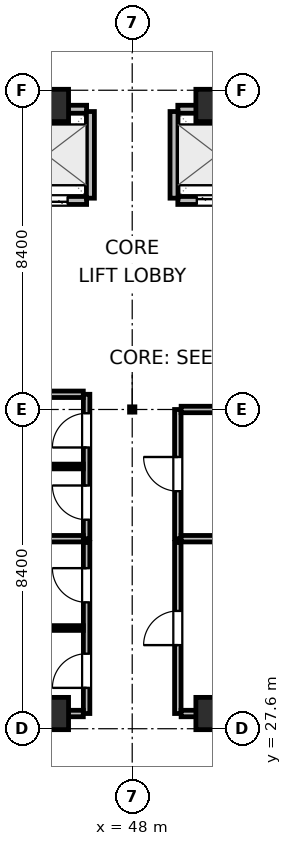
"""IFC4 building model, lengths in metres.
Left out: names, types, materials, properties, quantities, classifications, styles, units other than length and angle.
Written with IfcOpenShell. Run it as: python <this file> out.ifc"""

import sys

from ifc_helpers import new_model, si_unit, direction, frame, frame_2d, origin, origin_2d, place, context, subcontext, project, spatial, rectangle, extrude, element, fill, save


model = new_model("IFC4")
c1 = context("Model", 3, precision=1e-05, world=origin(), true_north=direction((0.0, 1.0)))
c2 = subcontext(c1, "Body", "Model", "MODEL_VIEW")
j1 = project(units=[si_unit("LENGTHUNIT", "METRE"), si_unit("PLANEANGLEUNIT", "RADIAN")], contexts=[c1])
p1 = place(None, origin())
s1 = spatial("IfcSite", under=j1, at=p1, CompositionType="ELEMENT")
p2 = place(p1, origin())
s2 = spatial("IfcBuilding", under=s1, at=p2, CompositionType="ELEMENT")
p3 = place(p2, frame((0.0, 0.0, 181.8)))
s3 = spatial("IfcBuildingStorey", under=s2, at=p3, CompositionType="ELEMENT", Elevation=181.8)
for number, where, z_axis, x_axis in (
    (1, (45.9, 28.0, 0.0), (0.0, 0.0, 1.0), (1.0, 0.0, 0.0)),
    (2, (50.1, 28.0, 0.0), (0.0, 0.0, 1.0), (1.0, 0.0, 0.0)),
    (3, (45.9, 44.0, 0.0), (0.0, 0.0, 1.0), (1.0, 0.0, 0.0)),
    (4, (50.1, 44.0, 0.0), (0.0, 0.0, 1.0), (1.0, 0.0, 0.0)),
):
    element("IfcColumn", number, at=place(p3, frame(where, z_axis=z_axis, x_axis=x_axis)), inside=s3, PredefinedType="COLUMN", context=c2, shape_type="SweptSolid", body=[
        extrude(rectangle(XDim=0.85, YDim=0.85, at=origin_2d()), origin(), (0.0, 0.0, 1.0), 4.5),
    ])
p4 = place(p3, frame((44.7, 41.5, 0.0), z_axis=(0.0, 0.0, 1.0), x_axis=(1.0, 0.0, 0.0)))
e5 = element("IfcWall", 5, at=p4, inside=s3, PredefinedType="PARTITIONING", context=c2, shape_type="SweptSolid", body=[
    extrude(rectangle(XDim=2.1, YDim=0.21, at=frame_2d((1.05, 0.0))), origin(), (0.0, 0.0, 1.0), 4.28),
])
p5 = place(p4, frame((0.5, 0.0, 0.0)))
e6 = element("IfcOpeningElement", 6, at=p5, cuts=e5, PredefinedType="OPENING", context=c2, shape_type="SweptSolid", body=[
    extrude(rectangle(XDim=1.1, YDim=2.04, at=frame_2d((0.55, 1.02))), frame((0.0, 0.115, 0.0), z_axis=(0.0, -1.0, 0.0), x_axis=(1.0, 0.0, 0.0)), (0.0, 0.0, 1.0), 0.23),
])
p6 = place(p3, frame((44.7, 43.9, 0.0), z_axis=(0.0, 0.0, 1.0), x_axis=(1.0, 0.0, 0.0)))
e7 = element("IfcWall", 7, at=p6, inside=s3, PredefinedType="PARTITIONING", context=c2, shape_type="SweptSolid", body=[
    extrude(rectangle(XDim=2.1, YDim=0.21, at=frame_2d((1.05, 0.0))), origin(), (0.0, 0.0, 1.0), 3.365),
])
p7 = place(p3, frame((46.9, 41.56, 0.0), z_axis=(0.0, 0.0, 1.0), x_axis=(0.0, 1.0, 0.0)))
e8 = element("IfcWall", 8, at=p7, inside=s3, PredefinedType="PARTITIONING", context=c2, shape_type="SweptSolid", body=[
    extrude(rectangle(XDim=2.28, YDim=0.21, at=frame_2d((1.14, 0.0))), origin(), (0.0, 0.0, 1.0), 4.28),
])
p8 = place(p3, frame((49.2, 41.5, 0.0), z_axis=(0.0, 0.0, 1.0), x_axis=(1.0, 0.0, 0.0)))
e9 = element("IfcWall", 9, at=p8, inside=s3, PredefinedType="PARTITIONING", context=c2, shape_type="SweptSolid", body=[
    extrude(rectangle(XDim=2.1, YDim=0.21, at=frame_2d((1.05, 0.0))), origin(), (0.0, 0.0, 1.0), 4.28),
])
p9 = place(p8, frame((0.5, 0.0, 0.0)))
e10 = element("IfcOpeningElement", 10, at=p9, cuts=e9, PredefinedType="OPENING", context=c2, shape_type="SweptSolid", body=[
    extrude(rectangle(XDim=1.1, YDim=2.04, at=frame_2d((0.55, 1.02))), frame((0.0, 0.115, 0.0), z_axis=(0.0, -1.0, 0.0), x_axis=(1.0, 0.0, 0.0)), (0.0, 0.0, 1.0), 0.23),
])
p10 = place(p3, frame((49.2, 43.9, 0.0), z_axis=(0.0, 0.0, 1.0), x_axis=(1.0, 0.0, 0.0)))
e11 = element("IfcWall", 11, at=p10, inside=s3, PredefinedType="PARTITIONING", context=c2, shape_type="SweptSolid", body=[
    extrude(rectangle(XDim=2.1, YDim=0.21, at=frame_2d((1.05, 0.0))), origin(), (0.0, 0.0, 1.0), 3.365),
])
p11 = place(p3, frame((49.1, 41.56, 0.0), z_axis=(0.0, 0.0, 1.0), x_axis=(0.0, 1.0, 0.0)))
e12 = element("IfcWall", 12, at=p11, inside=s3, PredefinedType="PARTITIONING", context=c2, shape_type="SweptSolid", body=[
    extrude(rectangle(XDim=2.28, YDim=0.21, at=frame_2d((1.14, 0.0))), origin(), (0.0, 0.0, 1.0), 4.28),
])
p12 = place(p3, frame((46.8, 32.6, 0.0), z_axis=(0.0, 0.0, 1.0), x_axis=(0.0, 1.0, 0.0)))
e13 = element("IfcWall", 13, at=p12, inside=s3, PredefinedType="PARTITIONING", context=c2, shape_type="SweptSolid", body=[
    extrude(rectangle(XDim=3.8, YDim=0.17, at=frame_2d((1.9, 0.0))), origin(), (0.0, 0.0, 1.0), 4.28),
])
p13 = place(p12, frame((0.5, 0.0, 0.0)))
e14 = element("IfcOpeningElement", 14, at=p13, cuts=e13, PredefinedType="OPENING", context=c2, shape_type="SweptSolid", body=[
    extrude(rectangle(XDim=0.9, YDim=2.02, at=frame_2d((0.45, 1.01))), frame((0.0, 0.095, 0.0), z_axis=(0.0, -1.0, 0.0), x_axis=(1.0, 0.0, 0.0)), (0.0, 0.0, 1.0), 0.19),
])
p14 = place(p12, frame((2.4, 0.0, 0.0)))
e15 = element("IfcOpeningElement", 15, at=p14, cuts=e13, PredefinedType="OPENING", context=c2, shape_type="SweptSolid", body=[
    extrude(rectangle(XDim=0.9, YDim=2.02, at=frame_2d((0.45, 1.01))), frame((0.0, 0.095, 0.0), z_axis=(0.0, -1.0, 0.0), x_axis=(1.0, 0.0, 0.0)), (0.0, 0.0, 1.0), 0.19),
])
for number, where, z_axis, x_axis in (
    (16, (43.8, 32.6, 0.0), (0.0, 0.0, 1.0), (1.0, 0.0, 0.0)),
    (17, (43.8, 36.4, 0.0), (0.0, 0.0, 1.0), (1.0, 0.0, 0.0)),
):
    element("IfcWall", number, at=place(p3, frame(where, z_axis=z_axis, x_axis=x_axis)), inside=s3, PredefinedType="PARTITIONING", context=c2, shape_type="SweptSolid", body=[
        extrude(rectangle(XDim=2.913, YDim=0.17, at=frame_2d((1.457, 0.0))), origin(), (0.0, 0.0, 1.0), 4.28),
    ])
p15 = place(p3, frame((43.8, 34.5, 0.0), z_axis=(0.0, 0.0, 1.0), x_axis=(1.0, 0.0, 0.0)))
e18 = element("IfcWall", 18, at=p15, inside=s3, PredefinedType="PARTITIONING", context=c2, shape_type="SweptSolid", body=[
    extrude(rectangle(XDim=2.913, YDim=0.125, at=frame_2d((1.457, 0.0))), origin(), (0.0, 0.0, 1.0), 4.28),
])
p16 = place(p3, frame((49.2, 32.6, 0.0), z_axis=(0.0, 0.0, 1.0), x_axis=(0.0, 1.0, 0.0)))
e19 = element("IfcWall", 19, at=p16, inside=s3, PredefinedType="PARTITIONING", context=c2, shape_type="SweptSolid", body=[
    extrude(rectangle(XDim=3.4, YDim=0.17, at=frame_2d((1.7, 0.0))), origin(), (0.0, 0.0, 1.0), 4.28),
])
p17 = place(p16, frame((1.25, 0.0, 0.0)))
e20 = element("IfcOpeningElement", 20, at=p17, cuts=e19, PredefinedType="OPENING", context=c2, shape_type="SweptSolid", body=[
    extrude(rectangle(XDim=0.9, YDim=2.02, at=frame_2d((0.45, 1.01))), frame((0.0, 0.095, 0.0), z_axis=(0.0, -1.0, 0.0), x_axis=(1.0, 0.0, 0.0)), (0.0, 0.0, 1.0), 0.19),
])
for number, where, z_axis, x_axis in (
    (21, (49.287, 32.6, 0.0), (0.0, 0.0, 1.0), (1.0, 0.0, 0.0)),
    (22, (49.287, 36.0, 0.0), (0.0, 0.0, 1.0), (1.0, 0.0, 0.0)),
):
    element("IfcWall", number, at=place(p3, frame(where, z_axis=z_axis, x_axis=x_axis)), inside=s3, PredefinedType="PARTITIONING", context=c2, shape_type="SweptSolid", body=[
        extrude(rectangle(XDim=2.913, YDim=0.17, at=frame_2d((1.457, 0.0))), origin(), (0.0, 0.0, 1.0), 4.28),
    ])
p18 = place(p3, frame((46.8, 28.0, 0.0), z_axis=(0.0, 0.0, 1.0), x_axis=(0.0, 1.0, 0.0)))
e23 = element("IfcWall", 23, at=p18, inside=s3, PredefinedType="PARTITIONING", context=c2, shape_type="SweptSolid", body=[
    extrude(rectangle(XDim=4.5, YDim=0.17, at=frame_2d((2.25, 0.0))), origin(), (0.0, 0.0, 1.0), 4.28),
])
p19 = place(p18, frame((0.675, 0.0, 0.0)))
e24 = element("IfcOpeningElement", 24, at=p19, cuts=e23, PredefinedType="OPENING", context=c2, shape_type="SweptSolid", body=[
    extrude(rectangle(XDim=0.9, YDim=2.02, at=frame_2d((0.45, 1.01))), frame((0.0, 0.095, 0.0), z_axis=(0.0, -1.0, 0.0), x_axis=(1.0, 0.0, 0.0)), (0.0, 0.0, 1.0), 0.19),
])
p20 = place(p18, frame((2.925, 0.0, 0.0)))
e25 = element("IfcOpeningElement", 25, at=p20, cuts=e23, PredefinedType="OPENING", context=c2, shape_type="SweptSolid", body=[
    extrude(rectangle(XDim=0.9, YDim=2.02, at=frame_2d((0.45, 1.01))), frame((0.0, 0.095, 0.0), z_axis=(0.0, -1.0, 0.0), x_axis=(1.0, 0.0, 0.0)), (0.0, 0.0, 1.0), 0.19),
])
p21 = place(p3, frame((42.5, 28.0, 0.0), z_axis=(0.0, 0.0, 1.0), x_axis=(1.0, 0.0, 0.0)))
e26 = element("IfcWall", 26, at=p21, inside=s3, PredefinedType="PARTITIONING", context=c2, shape_type="SweptSolid", body=[
    extrude(rectangle(XDim=4.213, YDim=0.17, at=frame_2d((2.106, 0.0))), origin(), (0.0, 0.0, 1.0), 3.365),
])
p22 = place(p3, frame((42.5, 30.25, 0.0), z_axis=(0.0, 0.0, 1.0), x_axis=(1.0, 0.0, 0.0)))
e27 = element("IfcWall", 27, at=p22, inside=s3, PredefinedType="PARTITIONING", context=c2, shape_type="SweptSolid", body=[
    extrude(rectangle(XDim=4.213, YDim=0.125, at=frame_2d((2.106, 0.0))), origin(), (0.0, 0.0, 1.0), 4.28),
])
p23 = place(p3, frame((49.2, 28.0, 0.0), z_axis=(0.0, 0.0, 1.0), x_axis=(0.0, 1.0, 0.0)))
e28 = element("IfcWall", 28, at=p23, inside=s3, PredefinedType="PARTITIONING", context=c2, shape_type="SweptSolid", body=[
    extrude(rectangle(XDim=4.5, YDim=0.17, at=frame_2d((2.25, 0.0))), origin(), (0.0, 0.0, 1.0), 4.28),
])
p24 = place(p23, frame((1.8, 0.0, 0.0)))
e29 = element("IfcOpeningElement", 29, at=p24, cuts=e28, PredefinedType="OPENING", context=c2, shape_type="SweptSolid", body=[
    extrude(rectangle(XDim=0.9, YDim=2.02, at=frame_2d((0.45, 1.01))), frame((0.0, 0.095, 0.0), z_axis=(0.0, -1.0, 0.0), x_axis=(1.0, 0.0, 0.0)), (0.0, 0.0, 1.0), 0.19),
])
p25 = place(p3, frame((49.287, 28.0, 0.0), z_axis=(0.0, 0.0, 1.0), x_axis=(1.0, 0.0, 0.0)))
e30 = element("IfcWall", 30, at=p25, inside=s3, PredefinedType="PARTITIONING", context=c2, shape_type="SweptSolid", body=[
    extrude(rectangle(XDim=4.213, YDim=0.17, at=frame_2d((2.106, 0.0))), origin(), (0.0, 0.0, 1.0), 3.365),
])
p26 = place(p5, origin())
e31 = element("IfcDoor", 31, at=p26, inside=s3, OperationType="DOUBLE_DOOR_SLIDING", PredefinedType="DOOR", context=c2, shape_type="SweptSolid", body=[
    extrude(rectangle(XDim=1.1, YDim=2.04, at=frame_2d((0.55, 1.02))), frame((0.0, 0.025, 0.0), z_axis=(0.0, -1.0, 0.0), x_axis=(1.0, 0.0, 0.0)), (0.0, 0.0, 1.0), 0.05),
])
fill(e6, e31)
p27 = place(p9, origin())
e32 = element("IfcDoor", 32, at=p27, inside=s3, OperationType="DOUBLE_DOOR_SLIDING", PredefinedType="DOOR", context=c2, shape_type="SweptSolid", body=[
    extrude(rectangle(XDim=1.1, YDim=2.04, at=frame_2d((0.55, 1.02))), frame((0.0, 0.025, 0.0), z_axis=(0.0, -1.0, 0.0), x_axis=(1.0, 0.0, 0.0)), (0.0, 0.0, 1.0), 0.05),
])
fill(e10, e32)
p28 = place(p13, origin())
e33 = element("IfcDoor", 33, at=p28, inside=s3, OperationType="SINGLE_SWING_RIGHT", PredefinedType="DOOR", context=c2, shape_type="SweptSolid", body=[
    extrude(rectangle(XDim=0.9, YDim=2.02, at=frame_2d((0.45, 1.01))), frame((0.0, 0.025, 0.0), z_axis=(0.0, -1.0, 0.0), x_axis=(1.0, 0.0, 0.0)), (0.0, 0.0, 1.0), 0.05),
])
fill(e14, e33)
p29 = place(p14, origin())
e34 = element("IfcDoor", 34, at=p29, inside=s3, OperationType="SINGLE_SWING_LEFT", PredefinedType="DOOR", context=c2, shape_type="SweptSolid", body=[
    extrude(rectangle(XDim=0.9, YDim=2.02, at=frame_2d((0.45, 1.01))), frame((0.0, 0.025, 0.0), z_axis=(0.0, -1.0, 0.0), x_axis=(1.0, 0.0, 0.0)), (0.0, 0.0, 1.0), 0.05),
])
fill(e15, e34)
p30 = place(p17, origin())
e35 = element("IfcDoor", 35, at=p30, inside=s3, OperationType="SINGLE_SWING_RIGHT", PredefinedType="DOOR", context=c2, shape_type="SweptSolid", body=[
    extrude(rectangle(XDim=0.9, YDim=2.02, at=frame_2d((0.45, 1.01))), frame((0.0, 0.025, 0.0), z_axis=(0.0, -1.0, 0.0), x_axis=(1.0, 0.0, 0.0)), (0.0, 0.0, 1.0), 0.05),
])
fill(e20, e35)
p31 = place(p19, origin())
e36 = element("IfcDoor", 36, at=p31, inside=s3, OperationType="SINGLE_SWING_LEFT", PredefinedType="DOOR", context=c2, shape_type="SweptSolid", body=[
    extrude(rectangle(XDim=0.9, YDim=2.02, at=frame_2d((0.45, 1.01))), frame((0.0, 0.025, 0.0), z_axis=(0.0, -1.0, 0.0), x_axis=(1.0, 0.0, 0.0)), (0.0, 0.0, 1.0), 0.05),
])
fill(e24, e36)
p32 = place(p20, origin())
e37 = element("IfcDoor", 37, at=p32, inside=s3, OperationType="SINGLE_SWING_RIGHT", PredefinedType="DOOR", context=c2, shape_type="SweptSolid", body=[
    extrude(rectangle(XDim=0.9, YDim=2.02, at=frame_2d((0.45, 1.01))), frame((0.0, 0.025, 0.0), z_axis=(0.0, -1.0, 0.0), x_axis=(1.0, 0.0, 0.0)), (0.0, 0.0, 1.0), 0.05),
])
fill(e25, e37)
p33 = place(p24, origin())
e38 = element("IfcDoor", 38, at=p33, inside=s3, OperationType="SINGLE_SWING_LEFT", PredefinedType="DOOR", context=c2, shape_type="SweptSolid", body=[
    extrude(rectangle(XDim=0.9, YDim=2.02, at=frame_2d((0.45, 1.01))), frame((0.0, 0.025, 0.0), z_axis=(0.0, -1.0, 0.0), x_axis=(1.0, 0.0, 0.0)), (0.0, 0.0, 1.0), 0.05),
])
fill(e29, e38)
save(model, sys.argv[1])
